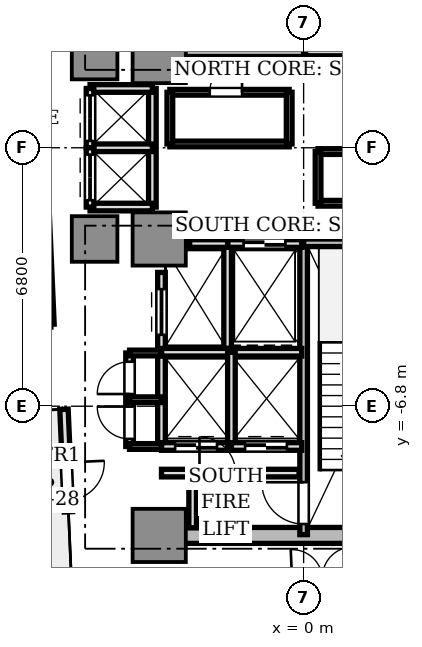
"""IFC4 building model, lengths in metres.
Left out: names, types, materials, properties, quantities, classifications, styles, units other than length and angle.
Written with IfcOpenShell. Run it as: python <this file> out.ifc"""

import sys

from ifc_helpers import new_model, si_unit, direction, frame, frame_2d, origin, origin_2d, place, context, subcontext, project, spatial, rectangle, extrude, source, transform, mapped, element, fill, save


model = new_model("IFC4")
c1 = context("Model", 3, precision=1e-05, world=origin(), true_north=direction((0.0, 1.0)))
c2 = subcontext(c1, "Body", "Model", "MODEL_VIEW")
j1 = project(units=[si_unit("LENGTHUNIT", "METRE"), si_unit("PLANEANGLEUNIT", "RADIAN")], contexts=[c1])
p1 = place(None, origin())
s1 = spatial("IfcSite", under=j1, at=p1, CompositionType="ELEMENT")
p2 = place(p1, origin())
s2 = spatial("IfcBuilding", under=s1, at=p2, CompositionType="ELEMENT")
p3 = place(p2, frame((0.0, 0.0, 106.95)))
s3 = spatial("IfcBuildingStorey", under=s2, at=p3, CompositionType="ELEMENT", Elevation=106.95)
p4 = place(p3, frame((-3.55, -10.2, 0.0), z_axis=(0.0, 0.0, 1.0), x_axis=(1.0, 0.0, 0.0)))
e1 = element("IfcWall", 1, at=p4, inside=s3, PredefinedType="SHEAR", context=c2, shape_type="SweptSolid", body=[
    extrude(rectangle(XDim=7.1, YDim=0.42, at=frame_2d((3.55, 0.0))), origin(), (0.0, 0.0, 1.0), 4.26),
])
m1 = source(origin(), c2, "Body", "SweptSolid", [
    extrude(rectangle(XDim=1.4, YDim=1.4, at=origin_2d()), origin(), (0.0, 0.0, 1.0), 4.26),
])
for number, where, z_axis, x_axis in (
    (2, (-3.8, 2.4, 0.0), (0.0, 0.0, 1.0), (1.0, 0.0, 0.0)),
    (3, (-3.8, -2.4, 0.0), (0.0, 0.0, 1.0), (1.0, 0.0, 0.0)),
    (4, (-3.8, -10.2, 0.0), (0.0, 0.0, 1.0), (1.0, 0.0, 0.0)),
):
    element("IfcColumn", number, at=place(p3, frame(where, z_axis=z_axis, x_axis=x_axis)), inside=s3, PredefinedType="COLUMN", context=c2, shape_type="MappedRepresentation", body=[
        mapped(m1, transform((0.0, 0.0, 0.0), scale=1.0)),
    ])
m2 = source(origin(), c2, "Body", "SweptSolid", [
    extrude(rectangle(XDim=1.2, YDim=1.2, at=origin_2d()), origin(), (0.0, 0.0, 1.0), 4.26),
])
for number, where, z_axis, x_axis in (
    (5, (-5.5, 2.4, 0.0), (0.0, 0.0, 1.0), (1.0, 0.0, 0.0)),
    (6, (-5.5, -2.4, 0.0), (0.0, 0.0, 1.0), (1.0, 0.0, 0.0)),
):
    element("IfcColumn", number, at=place(p3, frame(where, z_axis=z_axis, x_axis=x_axis)), inside=s3, PredefinedType="COLUMN", context=c2, shape_type="MappedRepresentation", body=[
        mapped(m2, transform((0.0, 0.0, 0.0), scale=1.0)),
    ])
p5 = place(p3, frame((-6.306, -6.882, 0.0), z_axis=(0.0, 0.0, 1.0), x_axis=(0.043672655174, -0.999045894436, 0.0)))
e7 = element("IfcWall", 7, at=p5, inside=s3, PredefinedType="STANDARD", context=c2, shape_type="SweptSolid", body=[
    extrude(rectangle(XDim=2.7, YDim=0.22, at=frame_2d((1.35, 0.0))), origin(), (0.0, 0.0, 1.0), 4.26),
])
p6 = place(p5, frame((1.4, 0.0, 0.0)))
e8 = element("IfcOpeningElement", 8, at=p6, cuts=e7, PredefinedType="OPENING", context=c2, shape_type="SweptSolid", body=[
    extrude(rectangle(XDim=1.0, YDim=2.2, at=frame_2d((0.5, 1.1))), frame((0.0, 0.12, 0.0), z_axis=(0.0, -1.0, 0.0), x_axis=(1.0, 0.0, 0.0)), (0.0, 0.0, 1.0), 0.24),
])
p7 = place(p3, frame((0.0, 2.5, 0.0), z_axis=(0.0, 0.0, 1.0), x_axis=(0.0, 1.0, 0.0)))
e9 = element("IfcWall", 9, at=p7, inside=s3, PredefinedType="SOLIDWALL", context=c2, shape_type="SweptSolid", body=[
    extrude(rectangle(XDim=7.68, YDim=0.2, at=frame_2d((3.84, 0.0))), origin(), (0.0, 0.0, 1.0), 4.26),
])
p8 = place(p7, frame((6.36, 0.0, 0.0)))
e10 = element("IfcOpeningElement", 10, at=p8, cuts=e9, PredefinedType="OPENING", context=c2, shape_type="SweptSolid", body=[
    extrude(rectangle(XDim=1.1, YDim=2.15, at=frame_2d((0.55, 1.075))), frame((0.0, 0.11, 0.0), z_axis=(0.0, -1.0, 0.0), x_axis=(1.0, 0.0, 0.0)), (0.0, 0.0, 1.0), 0.22),
])
p9 = place(p3, frame((-3.72, 2.5, 0.0), z_axis=(0.0, 0.0, 1.0), x_axis=(1.0, 0.0, 0.0)))
e11 = element("IfcWall", 11, at=p9, inside=s3, PredefinedType="SOLIDWALL", context=c2, shape_type="SweptSolid", body=[
    extrude(rectangle(XDim=3.72, YDim=0.2, at=frame_2d((1.86, 0.0))), origin(), (0.0, 0.0, 1.0), 4.26),
])
p10 = place(p3, frame((0.0, -10.18, 0.0), z_axis=(0.0, 0.0, 1.0), x_axis=(0.0, 1.0, 0.0)))
e12 = element("IfcWall", 12, at=p10, inside=s3, PredefinedType="SOLIDWALL", context=c2, shape_type="SweptSolid", body=[
    extrude(rectangle(XDim=7.68, YDim=0.2, at=frame_2d((3.84, 0.0))), origin(), (0.0, 0.0, 1.0), 4.26),
])
p11 = place(p10, frame((0.28, 0.0, 0.0)))
e13 = element("IfcOpeningElement", 13, at=p11, cuts=e12, PredefinedType="OPENING", context=c2, shape_type="SweptSolid", body=[
    extrude(rectangle(XDim=1.1, YDim=2.15, at=frame_2d((0.55, 1.075))), frame((0.0, 0.11, 0.0), z_axis=(0.0, -1.0, 0.0), x_axis=(1.0, 0.0, 0.0)), (0.0, 0.0, 1.0), 0.22),
])
p12 = place(p3, frame((0.0, -2.5, 0.0), z_axis=(0.0, 0.0, 1.0), x_axis=(1.0, 0.0, 0.0)))
e14 = element("IfcWall", 14, at=p12, inside=s3, PredefinedType="SOLIDWALL", context=c2, shape_type="SweptSolid", body=[
    extrude(rectangle(XDim=3.72, YDim=0.2, at=frame_2d((1.86, 0.0))), origin(), (0.0, 0.0, 1.0), 4.26),
])
p13 = place(p3, frame((0.05, 2.52, 0.0), z_axis=(0.0, 0.0, 1.0), x_axis=(1.0, 0.0, 0.0)))
e15 = element("IfcWall", 15, at=p13, inside=s3, PredefinedType="SOLIDWALL", context=c2, shape_type="SweptSolid", body=[
    extrude(rectangle(XDim=1.95, YDim=0.2, at=frame_2d((0.975, 0.0))), origin(), (0.0, 0.0, 1.0), 3.81),
])
p14 = place(p3, frame((-2.0, -5.28, 0.0), z_axis=(0.0, 0.0, 1.0), x_axis=(0.0, 1.0, 0.0)))
e16 = element("IfcWall", 16, at=p14, inside=s3, PredefinedType="SOLIDWALL", context=c2, shape_type="SweptSolid", body=[
    extrude(rectangle(XDim=2.78, YDim=0.2, at=frame_2d((1.39, 0.0))), origin(), (0.0, 0.0, 1.0), 3.81),
])
p15 = place(p3, frame((-2.0, -2.52, 0.0), z_axis=(0.0, 0.0, 1.0), x_axis=(1.0, 0.0, 0.0)))
e17 = element("IfcWall", 17, at=p15, inside=s3, PredefinedType="SOLIDWALL", context=c2, shape_type="SweptSolid", body=[
    extrude(rectangle(XDim=1.95, YDim=0.2, at=frame_2d((0.975, 0.0))), origin(), (0.0, 0.0, 1.0), 3.81),
])
p16 = place(p15, frame((0.42, 0.0, 0.0)))
e18 = element("IfcOpeningElement", 18, at=p16, cuts=e17, PredefinedType="OPENING", context=c2, shape_type="SweptSolid", body=[
    extrude(rectangle(XDim=1.1, YDim=2.2, at=frame_2d((0.55, 1.1))), frame((0.0, 0.11, 0.0), z_axis=(0.0, -1.0, 0.0), x_axis=(1.0, 0.0, 0.0)), (0.0, 0.0, 1.0), 0.22),
])
p17 = place(p3, frame((-3.0, -2.52, 0.0), z_axis=(0.0, 0.0, 1.0), x_axis=(1.0, 0.0, 0.0)))
e19 = element("IfcWall", 19, at=p17, inside=s3, PredefinedType="SOLIDWALL", context=c2, shape_type="SweptSolid", body=[
    extrude(rectangle(XDim=1.0, YDim=0.2, at=frame_2d((0.5, 0.0))), origin(), (0.0, 0.0, 1.0), 3.81),
])
p18 = place(p3, frame((-3.74, -5.36, 0.0), z_axis=(0.0, 0.0, 1.0), x_axis=(0.0, 1.0, 0.0)))
e20 = element("IfcWall", 20, at=p18, inside=s3, PredefinedType="SOLIDWALL", context=c2, shape_type="SweptSolid", body=[
    extrude(rectangle(XDim=2.08, YDim=0.2, at=frame_2d((1.04, 0.0))), origin(), (0.0, 0.0, 1.0), 3.81),
])
p19 = place(p18, frame((0.44, 0.0, 0.0)))
e21 = element("IfcOpeningElement", 21, at=p19, cuts=e20, PredefinedType="OPENING", context=c2, shape_type="SweptSolid", body=[
    extrude(rectangle(XDim=1.2, YDim=2.2, at=frame_2d((0.6, 1.1))), frame((0.0, 0.11, 0.0), z_axis=(0.0, -1.0, 0.0), x_axis=(1.0, 0.0, 0.0)), (0.0, 0.0, 1.0), 0.22),
])
p20 = place(p3, frame((-3.74, -7.86, 0.0), z_axis=(0.0, 0.0, 1.0), x_axis=(0.0, 1.0, 0.0)))
e22 = element("IfcWall", 22, at=p20, inside=s3, PredefinedType="SOLIDWALL", context=c2, shape_type="SweptSolid", body=[
    extrude(rectangle(XDim=2.48, YDim=0.2, at=frame_2d((1.24, 0.0))), origin(), (0.0, 0.0, 1.0), 3.81),
])
p21 = place(p3, frame((-3.74, -7.86, 0.0), z_axis=(0.0, 0.0, 1.0), x_axis=(1.0, 0.0, 0.0)))
e23 = element("IfcWall", 23, at=p21, inside=s3, PredefinedType="SOLIDWALL", context=c2, shape_type="SweptSolid", body=[
    extrude(rectangle(XDim=1.84, YDim=0.2, at=frame_2d((0.92, 0.0))), origin(), (0.0, 0.0, 1.0), 3.81),
])
p22 = place(p21, frame((0.36, 0.0, 0.0)))
e24 = element("IfcOpeningElement", 24, at=p22, cuts=e23, PredefinedType="OPENING", context=c2, shape_type="SweptSolid", body=[
    extrude(rectangle(XDim=1.1, YDim=2.2, at=frame_2d((0.55, 1.1))), frame((0.0, 0.11, 0.0), z_axis=(0.0, -1.0, 0.0), x_axis=(1.0, 0.0, 0.0)), (0.0, 0.0, 1.0), 0.22),
])
p23 = place(p3, frame((-3.74, -5.38, 0.0), z_axis=(0.0, 0.0, 1.0), x_axis=(1.0, 0.0, 0.0)))
e25 = element("IfcWall", 25, at=p23, inside=s3, PredefinedType="SOLIDWALL", context=c2, shape_type="SweptSolid", body=[
    extrude(rectangle(XDim=3.69, YDim=0.2, at=frame_2d((1.845, 0.0))), origin(), (0.0, 0.0, 1.0), 3.81),
])
p24 = place(p3, frame((-1.9, -7.86, 0.0), z_axis=(0.0, 0.0, 1.0), x_axis=(0.0, 1.0, 0.0)))
e26 = element("IfcWall", 26, at=p24, inside=s3, PredefinedType="SOLIDWALL", context=c2, shape_type="SweptSolid", body=[
    extrude(rectangle(XDim=2.48, YDim=0.2, at=frame_2d((1.24, 0.0))), origin(), (0.0, 0.0, 1.0), 3.81),
])
p25 = place(p3, frame((-1.9, -7.86, 0.0), z_axis=(0.0, 0.0, 1.0), x_axis=(1.0, 0.0, 0.0)))
e27 = element("IfcWall", 27, at=p25, inside=s3, PredefinedType="SOLIDWALL", context=c2, shape_type="SweptSolid", body=[
    extrude(rectangle(XDim=1.85, YDim=0.2, at=frame_2d((0.925, 0.0))), origin(), (0.0, 0.0, 1.0), 3.81),
])
p26 = place(p25, frame((0.36, 0.0, 0.0)))
e28 = element("IfcOpeningElement", 28, at=p26, cuts=e27, PredefinedType="OPENING", context=c2, shape_type="SweptSolid", body=[
    extrude(rectangle(XDim=1.1, YDim=2.2, at=frame_2d((0.55, 1.1))), frame((0.0, 0.11, 0.0), z_axis=(0.0, -1.0, 0.0), x_axis=(1.0, 0.0, 0.0)), (0.0, 0.0, 1.0), 0.22),
])
p27 = place(p3, frame((-3.98, -1.56, 0.0), z_axis=(0.0, 0.0, 1.0), x_axis=(0.0, 1.0, 0.0)))
e29 = element("IfcWall", 29, at=p27, inside=s3, PredefinedType="SOLIDWALL", context=c2, shape_type="SweptSolid", body=[
    extrude(rectangle(XDim=3.12, YDim=0.2, at=frame_2d((1.56, 0.0))), origin(), (0.0, 0.0, 1.0), 3.43),
])
for number, where, z_axis, x_axis in (
    (30, (-5.62, 1.56, 0.0), (0.0, 0.0, 1.0), (1.0, 0.0, 0.0)),
    (31, (-5.62, -1.56, 0.0), (0.0, 0.0, 1.0), (1.0, 0.0, 0.0)),
    (32, (-5.62, 0.0, 0.0), (0.0, 0.0, 1.0), (1.0, 0.0, 0.0)),
):
    element("IfcWall", number, at=place(p3, frame(where, z_axis=z_axis, x_axis=x_axis)), inside=s3, PredefinedType="SOLIDWALL", context=c2, shape_type="SweptSolid", body=[
        extrude(rectangle(XDim=1.64, YDim=0.2, at=frame_2d((0.82, 0.0))), origin(), (0.0, 0.0, 1.0), 3.81),
    ])
p28 = place(p3, frame((-5.62, 0.0, 0.0), z_axis=(0.0, 0.0, 1.0), x_axis=(0.0, 1.0, 0.0)))
e33 = element("IfcWall", 33, at=p28, inside=s3, PredefinedType="SOLIDWALL", context=c2, shape_type="SweptSolid", body=[
    extrude(rectangle(XDim=1.56, YDim=0.2, at=frame_2d((0.78, 0.0))), origin(), (0.0, 0.0, 1.0), 3.81),
])
p29 = place(p28, frame((0.18, 0.0, 0.0)))
e34 = element("IfcOpeningElement", 34, at=p29, cuts=e33, PredefinedType="OPENING", context=c2, shape_type="SweptSolid", body=[
    extrude(rectangle(XDim=1.2, YDim=2.2, at=frame_2d((0.6, 1.1))), frame((0.0, 0.11, 0.0), z_axis=(0.0, -1.0, 0.0), x_axis=(1.0, 0.0, 0.0)), (0.0, 0.0, 1.0), 0.22),
])
p30 = place(p3, frame((-5.62, -1.56, 0.0), z_axis=(0.0, 0.0, 1.0), x_axis=(0.0, 1.0, 0.0)))
e35 = element("IfcWall", 35, at=p30, inside=s3, PredefinedType="SOLIDWALL", context=c2, shape_type="SweptSolid", body=[
    extrude(rectangle(XDim=1.56, YDim=0.2, at=frame_2d((0.78, 0.0))), origin(), (0.0, 0.0, 1.0), 3.81),
])
p31 = place(p30, frame((0.18, 0.0, 0.0)))
e36 = element("IfcOpeningElement", 36, at=p31, cuts=e35, PredefinedType="OPENING", context=c2, shape_type="SweptSolid", body=[
    extrude(rectangle(XDim=1.2, YDim=2.2, at=frame_2d((0.6, 1.1))), frame((0.0, 0.11, 0.0), z_axis=(0.0, -1.0, 0.0), x_axis=(1.0, 0.0, 0.0)), (0.0, 0.0, 1.0), 0.22),
])
p32 = place(p3, frame((-3.74, -8.56, 0.0), z_axis=(0.0, 0.0, 1.0), x_axis=(1.0, 0.0, 0.0)))
e37 = element("IfcWall", 37, at=p32, inside=s3, PredefinedType="SOLIDWALL", context=c2, shape_type="SweptSolid", body=[
    extrude(rectangle(XDim=3.62, YDim=0.2, at=frame_2d((1.81, 0.0))), origin(), (0.0, 0.0, 1.0), 3.81),
])
p33 = place(p32, frame((1.0, 0.0, 0.0)))
e38 = element("IfcOpeningElement", 38, at=p33, cuts=e37, PredefinedType="OPENING", context=c2, shape_type="SweptSolid", body=[
    extrude(rectangle(XDim=0.95, YDim=2.15, at=frame_2d((0.475, 1.075))), frame((0.0, 0.11, 0.0), z_axis=(0.0, -1.0, 0.0), x_axis=(1.0, 0.0, 0.0)), (0.0, 0.0, 1.0), 0.22),
])
p34 = place(p3, frame((-2.92, -10.0, 0.0), z_axis=(0.0, 0.0, 1.0), x_axis=(0.0, 1.0, 0.0)))
e39 = element("IfcWall", 39, at=p34, inside=s3, PredefinedType="SOLIDWALL", context=c2, shape_type="SweptSolid", body=[
    extrude(rectangle(XDim=1.44, YDim=0.2, at=frame_2d((0.72, 0.0))), origin(), (0.0, 0.0, 1.0), 3.81),
])
p35 = place(p3, frame((-4.58, -7.86, 0.0), z_axis=(0.0, 0.0, 1.0), x_axis=(0.0, 1.0, 0.0)))
e40 = element("IfcWall", 40, at=p35, inside=s3, PredefinedType="SOLIDWALL", context=c2, shape_type="SweptSolid", body=[
    extrude(rectangle(XDim=2.46, YDim=0.2, at=frame_2d((1.23, 0.0))), origin(), (0.0, 0.0, 1.0), 3.81),
])
p36 = place(p35, frame((0.2, 0.0, 0.0)))
e41 = element("IfcOpeningElement", 41, at=p36, cuts=e40, PredefinedType="OPENING", context=c2, shape_type="SweptSolid", body=[
    extrude(rectangle(XDim=0.85, YDim=2.1, at=frame_2d((0.425, 1.05))), frame((0.0, 0.11, 0.0), z_axis=(0.0, -1.0, 0.0), x_axis=(1.0, 0.0, 0.0)), (0.0, 0.0, 1.0), 0.22),
])
p37 = place(p35, frame((1.38, 0.0, 0.0)))
e42 = element("IfcOpeningElement", 42, at=p37, cuts=e40, PredefinedType="OPENING", context=c2, shape_type="SweptSolid", body=[
    extrude(rectangle(XDim=0.85, YDim=2.1, at=frame_2d((0.425, 1.05))), frame((0.0, 0.11, 0.0), z_axis=(0.0, -1.0, 0.0), x_axis=(1.0, 0.0, 0.0)), (0.0, 0.0, 1.0), 0.22),
])
for number, where, z_axis, x_axis in (
    (43, (-4.58, -5.4, 0.0), (0.0, 0.0, 1.0), (1.0, 0.0, 0.0)),
    (44, (-4.58, -7.86, 0.0), (0.0, 0.0, 1.0), (1.0, 0.0, 0.0)),
    (45, (-4.58, -6.63, 0.0), (0.0, 0.0, 1.0), (1.0, 0.0, 0.0)),
):
    element("IfcWall", number, at=place(p3, frame(where, z_axis=z_axis, x_axis=x_axis)), inside=s3, PredefinedType="PARTITIONING", context=c2, shape_type="SweptSolid", body=[
        extrude(rectangle(XDim=0.84, YDim=0.15, at=frame_2d((0.42, 0.0))), origin(), (0.0, 0.0, 1.0), 3.81),
    ])
p38 = place(p3, frame((-3.52, 0.1, 0.0), z_axis=(0.0, 0.0, 1.0), x_axis=(1.0, 0.0, 0.0)))
e46 = element("IfcWall", 46, at=p38, inside=s3, PredefinedType="PARTITIONING", context=c2, shape_type="SweptSolid", body=[
    extrude(rectangle(XDim=3.14, YDim=0.15, at=frame_2d((1.57, 0.0))), origin(), (0.0, 0.0, 1.0), 3.81),
])
p39 = place(p3, frame((-3.52, 1.46, 0.0), z_axis=(0.0, 0.0, 1.0), x_axis=(1.0, 0.0, 0.0)))
e47 = element("IfcWall", 47, at=p39, inside=s3, PredefinedType="PARTITIONING", context=c2, shape_type="SweptSolid", body=[
    extrude(rectangle(XDim=3.14, YDim=0.15, at=frame_2d((1.57, 0.0))), origin(), (0.0, 0.0, 1.0), 3.81),
])
p40 = place(p39, frame((1.05, 0.0, 0.0)))
e48 = element("IfcOpeningElement", 48, at=p40, cuts=e47, PredefinedType="OPENING", context=c2, shape_type="SweptSolid", body=[
    extrude(rectangle(XDim=0.85, YDim=2.1, at=frame_2d((0.425, 1.05))), frame((0.0, 0.085, 0.0), z_axis=(0.0, -1.0, 0.0), x_axis=(1.0, 0.0, 0.0)), (0.0, 0.0, 1.0), 0.17),
])
p41 = place(p3, frame((-3.52, 0.1, 0.0), z_axis=(0.0, 0.0, 1.0), x_axis=(0.0, 1.0, 0.0)))
e49 = element("IfcWall", 49, at=p41, inside=s3, PredefinedType="PARTITIONING", context=c2, shape_type="SweptSolid", body=[
    extrude(rectangle(XDim=1.36, YDim=0.15, at=frame_2d((0.68, 0.0))), origin(), (0.0, 0.0, 1.0), 3.43),
])
p42 = place(p3, frame((-0.38, 0.1, 0.0), z_axis=(0.0, 0.0, 1.0), x_axis=(0.0, 1.0, 0.0)))
e50 = element("IfcWall", 50, at=p42, inside=s3, PredefinedType="PARTITIONING", context=c2, shape_type="SweptSolid", body=[
    extrude(rectangle(XDim=1.36, YDim=0.15, at=frame_2d((0.68, 0.0))), origin(), (0.0, 0.0, 1.0), 3.81),
])
p43 = place(p3, frame((0.38, -0.1, 0.0), z_axis=(0.0, 0.0, 1.0), x_axis=(1.0, 0.0, 0.0)))
e51 = element("IfcWall", 51, at=p43, inside=s3, PredefinedType="PARTITIONING", context=c2, shape_type="SweptSolid", body=[
    extrude(rectangle(XDim=3.14, YDim=0.15, at=frame_2d((1.57, 0.0))), origin(), (0.0, 0.0, 1.0), 3.81),
])
p44 = place(p3, frame((0.38, -1.46, 0.0), z_axis=(0.0, 0.0, 1.0), x_axis=(1.0, 0.0, 0.0)))
e52 = element("IfcWall", 52, at=p44, inside=s3, PredefinedType="PARTITIONING", context=c2, shape_type="SweptSolid", body=[
    extrude(rectangle(XDim=3.14, YDim=0.15, at=frame_2d((1.57, 0.0))), origin(), (0.0, 0.0, 1.0), 3.81),
])
p45 = place(p44, frame((1.05, 0.0, 0.0)))
e53 = element("IfcOpeningElement", 53, at=p45, cuts=e52, PredefinedType="OPENING", context=c2, shape_type="SweptSolid", body=[
    extrude(rectangle(XDim=0.85, YDim=2.1, at=frame_2d((0.425, 1.05))), frame((0.0, 0.085, 0.0), z_axis=(0.0, -1.0, 0.0), x_axis=(1.0, 0.0, 0.0)), (0.0, 0.0, 1.0), 0.17),
])
p46 = place(p3, frame((0.38, -1.46, 0.0), z_axis=(0.0, 0.0, 1.0), x_axis=(0.0, 1.0, 0.0)))
e54 = element("IfcWall", 54, at=p46, inside=s3, PredefinedType="PARTITIONING", context=c2, shape_type="SweptSolid", body=[
    extrude(rectangle(XDim=1.36, YDim=0.15, at=frame_2d((0.68, 0.0))), origin(), (0.0, 0.0, 1.0), 3.81),
])
p47 = place(p3, frame((-7.129, 6.245, 0.0), z_axis=(0.0, 0.0, 1.0), x_axis=(0.043608291235, -0.999048705988, 0.0)))
e55 = element("IfcWall", 55, at=p47, inside=s3, PredefinedType="PARTITIONING", context=c2, shape_type="SweptSolid", body=[
    extrude(rectangle(XDim=10.9, YDim=0.18, at=frame_2d((5.45, 0.0))), origin(), (0.0, 0.0, 1.0), 3.81),
])
p48 = place(p3, frame((-6.049, -11.625, 0.0), z_axis=(0.0, 0.0, 1.0), x_axis=(0.999047806124, 0.043628901879, 0.0)))
e56 = element("IfcWall", 56, at=p48, inside=s3, PredefinedType="PARTITIONING", context=c2, shape_type="SweptSolid", body=[
    extrude(rectangle(XDim=13.1, YDim=0.15, at=frame_2d((6.55, 0.0))), origin(), (0.0, 0.0, 1.0), 3.81),
])
p49 = place(p48, frame((5.75, 0.0, 0.0)))
e57 = element("IfcOpeningElement", 57, at=p49, cuts=e56, PredefinedType="OPENING", context=c2, shape_type="SweptSolid", body=[
    extrude(rectangle(XDim=1.6, YDim=2.25, at=frame_2d((0.8, 1.125))), frame((0.0, 0.085, 0.0), z_axis=(0.0, -1.0, 0.0), x_axis=(1.0, 0.0, 0.0)), (0.0, 0.0, 1.0), 0.17),
])
m3 = source(origin(), c2, "Body", "SweptSolid", [
    extrude(rectangle(XDim=1.0, YDim=0.05, at=origin_2d()), origin(), (0.0, 0.0, 1.0), 2.2),
])
p50 = place(p6, frame((0.5, 0.0, 0.0)))
e58 = element("IfcDoor", 58, at=p50, inside=s3, OperationType="SINGLE_SWING_LEFT", PredefinedType="DOOR", context=c2, shape_type="MappedRepresentation", body=[
    mapped(m3, transform((0.0, 0.0, 0.0), scale=1.0)),
])
fill(e8, e58)
m4 = source(origin(), c2, "Body", "SweptSolid", [
    extrude(rectangle(XDim=1.1, YDim=0.05, at=origin_2d()), origin(), (0.0, 0.0, 1.0), 2.2),
])
p51 = place(p16, frame((0.55, 0.0, 0.0)))
e59 = element("IfcDoor", 59, at=p51, inside=s3, OperationType="DOUBLE_DOOR_SLIDING", PredefinedType="DOOR", context=c2, shape_type="MappedRepresentation", body=[
    mapped(m4, transform((0.0, 0.0, 0.0), scale=1.0)),
])
fill(e18, e59)
m5 = source(origin(), c2, "Body", "SweptSolid", [
    extrude(rectangle(XDim=1.2, YDim=0.05, at=origin_2d()), origin(), (0.0, 0.0, 1.0), 2.2),
])
p52 = place(p19, frame((0.6, 0.0, 0.0)))
e60 = element("IfcDoor", 60, at=p52, inside=s3, OperationType="DOUBLE_DOOR_SLIDING", PredefinedType="DOOR", context=c2, shape_type="MappedRepresentation", body=[
    mapped(m5, transform((0.0, 0.0, 0.0), scale=1.0)),
])
fill(e21, e60)
p53 = place(p22, frame((0.55, 0.0, 0.0)))
e61 = element("IfcDoor", 61, at=p53, inside=s3, OperationType="DOUBLE_DOOR_SLIDING", PredefinedType="DOOR", context=c2, shape_type="MappedRepresentation", body=[
    mapped(m4, transform((0.0, 0.0, 0.0), scale=1.0)),
])
fill(e24, e61)
p54 = place(p26, frame((0.55, 0.0, 0.0)))
e62 = element("IfcDoor", 62, at=p54, inside=s3, OperationType="DOUBLE_DOOR_SLIDING", PredefinedType="DOOR", context=c2, shape_type="MappedRepresentation", body=[
    mapped(m4, transform((0.0, 0.0, 0.0), scale=1.0)),
])
fill(e28, e62)
p55 = place(p29, frame((0.6, 0.0, 0.0)))
e63 = element("IfcDoor", 63, at=p55, inside=s3, OperationType="DOUBLE_DOOR_SLIDING", PredefinedType="DOOR", context=c2, shape_type="MappedRepresentation", body=[
    mapped(m5, transform((0.0, 0.0, 0.0), scale=1.0)),
])
fill(e34, e63)
p56 = place(p31, frame((0.6, 0.0, 0.0)))
e64 = element("IfcDoor", 64, at=p56, inside=s3, OperationType="DOUBLE_DOOR_SLIDING", PredefinedType="DOOR", context=c2, shape_type="MappedRepresentation", body=[
    mapped(m5, transform((0.0, 0.0, 0.0), scale=1.0)),
])
fill(e36, e64)
m6 = source(origin(), c2, "Body", "SweptSolid", [
    extrude(rectangle(XDim=1.1, YDim=0.05, at=origin_2d()), origin(), (0.0, 0.0, 1.0), 2.15),
])
p57 = place(p11, frame((0.55, 0.0, 0.0)))
e65 = element("IfcDoor", 65, at=p57, inside=s3, OperationType="SINGLE_SWING_RIGHT", PredefinedType="DOOR", context=c2, shape_type="MappedRepresentation", body=[
    mapped(m6, transform((0.0, 0.0, 0.0), scale=1.0)),
])
fill(e13, e65)
m7 = source(origin(), c2, "Body", "SweptSolid", [
    extrude(rectangle(XDim=0.95, YDim=0.05, at=origin_2d()), origin(), (0.0, 0.0, 1.0), 2.15),
])
p58 = place(p33, frame((0.475, 0.0, 0.0)))
e66 = element("IfcDoor", 66, at=p58, inside=s3, OperationType="SINGLE_SWING_LEFT", PredefinedType="DOOR", context=c2, shape_type="MappedRepresentation", body=[
    mapped(m7, transform((0.0, 0.0, 0.0), scale=1.0)),
])
fill(e38, e66)
m8 = source(origin(), c2, "Body", "SweptSolid", [
    extrude(rectangle(XDim=0.85, YDim=0.05, at=origin_2d()), origin(), (0.0, 0.0, 1.0), 2.1),
])
p59 = place(p36, frame((0.425, 0.0, 0.0)))
e67 = element("IfcDoor", 67, at=p59, inside=s3, OperationType="SINGLE_SWING_RIGHT", PredefinedType="DOOR", context=c2, shape_type="MappedRepresentation", body=[
    mapped(m8, transform((0.0, 0.0, 0.0), scale=1.0)),
])
fill(e41, e67)
p60 = place(p37, frame((0.425, 0.0, 0.0)))
e68 = element("IfcDoor", 68, at=p60, inside=s3, OperationType="SINGLE_SWING_LEFT", PredefinedType="DOOR", context=c2, shape_type="MappedRepresentation", body=[
    mapped(m8, transform((0.0, 0.0, 0.0), scale=1.0)),
])
fill(e42, e68)
p61 = place(p40, frame((0.425, 0.0, 0.0)))
e69 = element("IfcDoor", 69, at=p61, inside=s3, OperationType="SINGLE_SWING_RIGHT", PredefinedType="DOOR", context=c2, shape_type="MappedRepresentation", body=[
    mapped(m8, transform((0.0, 0.0, 0.0), scale=1.0)),
])
fill(e48, e69)
save(model, sys.argv[1])
